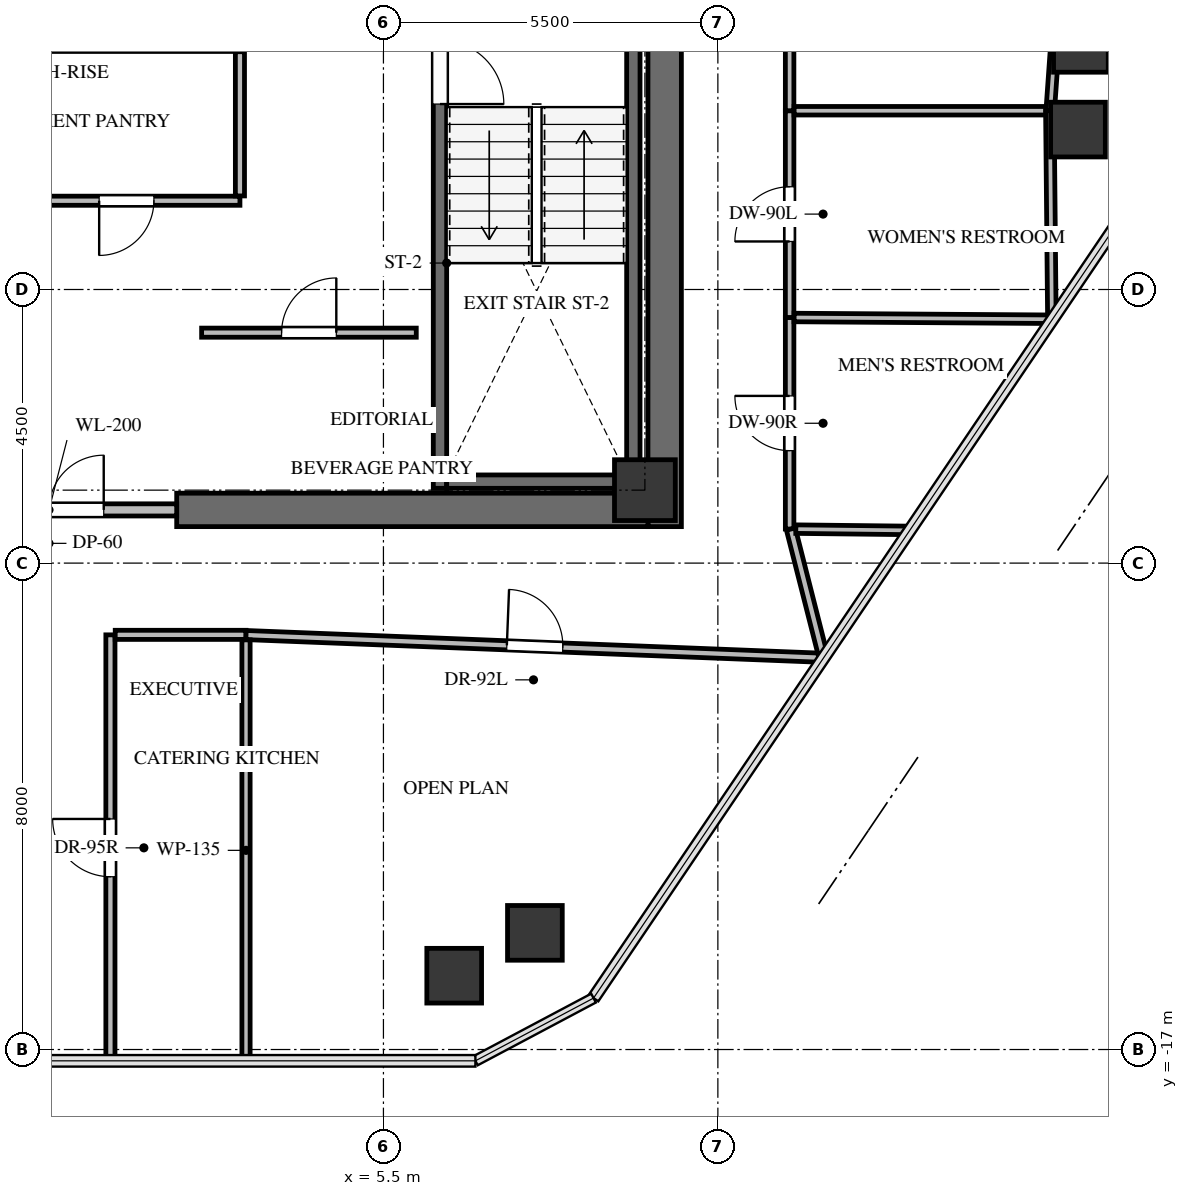
"""IFC4 building model, lengths in metres.
Left out: names, types, materials, properties, quantities, classifications, styles, units other than length and angle.
Written with IfcOpenShell. Run it as: python <this file> out.ifc"""

import sys

from ifc_helpers import new_model, si_unit, direction, frame, frame_2d, origin, origin_2d, place, context, subcontext, project, spatial, rectangle, extrude, source, transform, mapped, element, fill, save


model = new_model("IFC4")
c1 = context("Model", 3, precision=1e-05, world=origin(), true_north=direction((0.0, 1.0)))
c2 = subcontext(c1, "Body", "Model", "MODEL_VIEW")
j1 = project(units=[si_unit("LENGTHUNIT", "METRE"), si_unit("PLANEANGLEUNIT", "RADIAN")], contexts=[c1])
p1 = place(None, origin())
s1 = spatial("IfcSite", under=j1, at=p1, CompositionType="ELEMENT")
p2 = place(p1, origin())
s2 = spatial("IfcBuilding", under=s1, at=p2, CompositionType="ELEMENT")
p3 = place(p2, frame((0.0, 0.0, 224.9)))
s3 = spatial("IfcBuildingStorey", under=s2, at=p3, CompositionType="ELEMENT", Elevation=224.9)
p4 = place(p3, frame((10.125, -8.4, 0.0), z_axis=(0.0, 0.0, 1.0), x_axis=(0.0, 1.0, 0.0)))
e1 = element("IfcWall", 1, at=p4, inside=s3, PredefinedType="SHEAR", context=c2, shape_type="SweptSolid", body=[
    extrude(rectangle(XDim=16.8, YDim=0.55, at=frame_2d((8.4, 0.0))), origin(), (0.0, 0.0, 1.0), 3.3),
])
p5 = place(p3, frame((2.1, -8.125, 0.0), z_axis=(0.0, 0.0, 1.0), x_axis=(1.0, 0.0, 0.0)))
e2 = element("IfcWall", 2, at=p5, inside=s3, PredefinedType="SHEAR", context=c2, shape_type="SweptSolid", body=[
    extrude(rectangle(XDim=7.75, YDim=0.55, at=frame_2d((3.875, 0.0))), origin(), (0.0, 0.0, 1.0), 3.3),
])
p6 = place(p3, frame((9.61, -7.77, -0.24), z_axis=(0.0, 0.0, 1.0), x_axis=(0.0, 1.0, 0.0)))
e3 = element("IfcWall", 3, at=p6, inside=s3, PredefinedType="SHEAR", context=c2, shape_type="SweptSolid", body=[
    extrude(rectangle(XDim=7.89, YDim=0.22, at=frame_2d((3.945, 0.0))), origin(), (0.0, 0.0, 1.0), 3.3),
])
p7 = place(p3, frame((6.43, 0.12, -0.24), z_axis=(0.0, 0.0, 1.0), x_axis=(0.0, -1.0, 0.0)))
e4 = element("IfcWall", 4, at=p7, inside=s3, PredefinedType="SHEAR", context=c2, shape_type="SweptSolid", body=[
    extrude(rectangle(XDim=7.89, YDim=0.22, at=frame_2d((3.945, 0.0))), origin(), (0.0, 0.0, 1.0), 3.3),
])
p8 = place(p7, frame((0.52, 0.0, 0.0)))
e5 = element("IfcOpeningElement", 5, at=p8, cuts=e4, PredefinedType="OPENING", context=c2, shape_type="SweptSolid", body=[
    extrude(rectangle(XDim=1.05, YDim=2.15, at=frame_2d((0.525, 1.075))), frame((0.0, 0.12, 0.0), z_axis=(0.0, -1.0, 0.0), x_axis=(1.0, 0.0, 0.0)), (0.0, 0.0, 1.0), 0.24),
])
p9 = place(p3, frame((6.54, -7.66, -0.24), z_axis=(0.0, 0.0, 1.0), x_axis=(1.0, 0.0, 0.0)))
e6 = element("IfcWall", 6, at=p9, inside=s3, PredefinedType="SHEAR", context=c2, shape_type="SweptSolid", body=[
    extrude(rectangle(XDim=2.96, YDim=0.22, at=frame_2d((1.48, 0.0))), origin(), (0.0, 0.0, 1.0), 3.3),
])
m1 = source(origin(), c2, "Body", "SweptSolid", [
    extrude(rectangle(XDim=1.0, YDim=1.0, at=origin_2d()), origin(), (0.0, 0.0, 1.0), 3.3),
])
p10 = place(p3, frame((9.8, -7.8, -0.24), z_axis=(0.0, 0.0, 1.0), x_axis=(1.0, 0.0, 0.0)))
e7 = element("IfcColumn", 7, at=p10, inside=s3, PredefinedType="COLUMN", context=c2, shape_type="MappedRepresentation", body=[
    mapped(m1, transform((0.0, 0.0, 0.0), x_axis=(1.0, 0.0, 0.0), y_axis=(0.0, 1.0, 0.0), z_axis=(0.0, 0.0, 1.0), scale=1.0)),
])
m2 = source(origin(), c2, "Body", "SweptSolid", [
    extrude(rectangle(XDim=0.9, YDim=0.9, at=origin_2d()), origin(), (0.0, 0.0, 1.0), 3.3),
])
for number, where, z_axis, x_axis in (
    (8, (16.97, -0.476, -0.24), (0.0, 0.0, 1.0), (1.0, 0.0, 0.0)),
    (9, (16.922, -1.87, -0.24), (0.0, 0.0, 1.0), (1.0, 0.0, 0.0)),
    (10, (7.991, -15.081, -0.24), (0.0, 0.0, 1.0), (1.0, 0.0, 0.0)),
    (11, (6.664, -15.786, -0.24), (0.0, 0.0, 1.0), (1.0, 0.0, 0.0)),
):
    element("IfcColumn", number, at=place(p3, frame(where, z_axis=z_axis, x_axis=x_axis)), inside=s3, PredefinedType="COLUMN", context=c2, shape_type="MappedRepresentation", body=[
        mapped(m2, transform((0.0, 0.0, 0.0), x_axis=(1.0, 0.0, 0.0), y_axis=(0.0, 1.0, 0.0), z_axis=(0.0, 0.0, 1.0), scale=1.0)),
    ])
p11 = place(p3, frame((-2.1, -8.125, 0.0), z_axis=(0.0, 0.0, 1.0), x_axis=(1.0, 0.0, 0.0)))
e12 = element("IfcWall", 12, at=p11, inside=s3, PredefinedType="SOLIDWALL", context=c2, shape_type="SweptSolid", body=[
    extrude(rectangle(XDim=4.2, YDim=0.2, at=frame_2d((2.1, 0.0))), origin(), (0.0, 0.0, 1.0), 3.045),
])
p12 = place(p11, frame((1.2, 0.0, 0.0)))
e13 = element("IfcOpeningElement", 13, at=p12, cuts=e12, PredefinedType="OPENING", context=c2, shape_type="SweptSolid", body=[
    extrude(rectangle(XDim=1.8, YDim=2.15, at=frame_2d((0.9, 1.075))), frame((0.0, 0.11, 0.0), z_axis=(0.0, -1.0, 0.0), x_axis=(1.0, 0.0, 0.0)), (0.0, 0.0, 1.0), 0.22),
])
p13 = place(p3, frame((2.51, -5.21, 0.0), z_axis=(0.0, 0.0, 1.0), x_axis=(1.0, 0.0, 0.0)))
e14 = element("IfcWall", 14, at=p13, inside=s3, PredefinedType="PARTITIONING", context=c2, shape_type="SweptSolid", body=[
    extrude(rectangle(XDim=3.53, YDim=0.15, at=frame_2d((1.765, 0.0))), origin(), (0.0, 0.0, 1.0), 3.045),
])
p14 = place(p13, frame((1.315, 0.0, 0.0)))
e15 = element("IfcOpeningElement", 15, at=p14, cuts=e14, PredefinedType="OPENING", context=c2, shape_type="SweptSolid", body=[
    extrude(rectangle(XDim=0.9, YDim=2.05, at=frame_2d((0.45, 1.025))), frame((0.0, 0.085, 0.0), z_axis=(0.0, -1.0, 0.0), x_axis=(1.0, 0.0, 0.0)), (0.0, 0.0, 1.0), 0.17),
])
p15 = place(p3, frame((3.14, -3.04, 0.0), z_axis=(0.0, 0.0, 1.0), x_axis=(-1.0, 0.0, 0.0)))
e16 = element("IfcWall", 16, at=p15, inside=s3, PredefinedType="PARTITIONING", context=c2, shape_type="SweptSolid", body=[
    extrude(rectangle(XDim=3.73, YDim=0.15, at=frame_2d((1.865, 0.0))), origin(), (0.0, 0.0, 1.0), 3.045),
])
p16 = place(p15, frame((1.415, 0.0, 0.0)))
e17 = element("IfcOpeningElement", 17, at=p16, cuts=e16, PredefinedType="OPENING", context=c2, shape_type="SweptSolid", body=[
    extrude(rectangle(XDim=0.9, YDim=2.05, at=frame_2d((0.45, 1.025))), frame((0.0, 0.085, 0.0), z_axis=(0.0, -1.0, 0.0), x_axis=(1.0, 0.0, 0.0)), (0.0, 0.0, 1.0), 0.17),
])
p17 = place(p3, frame((3.14, -0.589, 0.0), z_axis=(0.0, 0.0, 1.0), x_axis=(0.0, -1.0, 0.0)))
e18 = element("IfcWall", 18, at=p17, inside=s3, PredefinedType="PARTITIONING", context=c2, shape_type="SweptSolid", body=[
    extrude(rectangle(XDim=2.372, YDim=0.15, at=frame_2d((1.186, 0.0))), origin(), (0.0, 0.0, 1.0), 3.045),
])
p18 = place(p3, frame((12.18, -8.44, 0.0), z_axis=(0.0, 0.0, 1.0), x_axis=(0.0, 1.0, 0.0)))
e19 = element("IfcWall", 19, at=p18, inside=s3, PredefinedType="PARTITIONING", context=c2, shape_type="SweptSolid", body=[
    extrude(rectangle(XDim=3.48, YDim=0.14, at=frame_2d((1.74, 0.0))), origin(), (0.0, 0.0, 1.0), 2.399),
])
p19 = place(p18, frame((1.29, 0.0, 0.0)))
e20 = element("IfcOpeningElement", 20, at=p19, cuts=e19, PredefinedType="OPENING", context=c2, shape_type="SweptSolid", body=[
    extrude(rectangle(XDim=0.9, YDim=2.05, at=frame_2d((0.45, 1.025))), frame((0.0, 0.08, 0.0), z_axis=(0.0, -1.0, 0.0), x_axis=(1.0, 0.0, 0.0)), (0.0, 0.0, 1.0), 0.16),
])
p20 = place(p3, frame((12.18, -4.96, 0.0), z_axis=(0.0, 0.0, 1.0), x_axis=(0.0, 1.0, 0.0)))
e21 = element("IfcWall", 21, at=p20, inside=s3, PredefinedType="PARTITIONING", context=c2, shape_type="SweptSolid", body=[
    extrude(rectangle(XDim=3.4, YDim=0.14, at=frame_2d((1.7, 0.0))), origin(), (0.0, 0.0, 1.0), 3.045),
])
p21 = place(p20, frame((1.25, 0.0, 0.0)))
e22 = element("IfcOpeningElement", 22, at=p21, cuts=e21, PredefinedType="OPENING", context=c2, shape_type="SweptSolid", body=[
    extrude(rectangle(XDim=0.9, YDim=2.05, at=frame_2d((0.45, 1.025))), frame((0.0, 0.08, 0.0), z_axis=(0.0, -1.0, 0.0), x_axis=(1.0, 0.0, 0.0)), (0.0, 0.0, 1.0), 0.16),
])
p22 = place(p3, frame((12.18, -1.56, 0.0), z_axis=(0.0, 0.0, 1.0), x_axis=(0.0, 1.0, 0.0)))
e23 = element("IfcWall", 23, at=p22, inside=s3, PredefinedType="PARTITIONING", context=c2, shape_type="SweptSolid", body=[
    extrude(rectangle(XDim=4.05, YDim=0.14, at=frame_2d((2.025, 0.0))), origin(), (0.0, 0.0, 1.0), 2.302),
])
p23 = place(p22, frame((1.575, 0.0, 0.0)))
e24 = element("IfcOpeningElement", 24, at=p23, cuts=e23, PredefinedType="OPENING", context=c2, shape_type="SweptSolid", body=[
    extrude(rectangle(XDim=0.9, YDim=2.05, at=frame_2d((0.45, 1.025))), frame((0.0, 0.08, 0.0), z_axis=(0.0, -1.0, 0.0), x_axis=(1.0, 0.0, 0.0)), (0.0, 0.0, 1.0), 0.16),
])
p24 = place(p3, frame((1.01, -17.186, 0.0), z_axis=(0.0, 0.0, 1.0), x_axis=(0.0, 1.0, 0.0)))
e25 = element("IfcWall", 25, at=p24, inside=s3, PredefinedType="PARTITIONING", context=c2, shape_type="SweptSolid", body=[
    extrude(rectangle(XDim=7.006, YDim=0.15, at=frame_2d((3.503, 0.0))), origin(), (0.0, 0.0, 1.0), 2.399),
])
p25 = place(p24, frame((3.028, 0.0, 0.0)))
e26 = element("IfcOpeningElement", 26, at=p25, cuts=e25, PredefinedType="OPENING", context=c2, shape_type="SweptSolid", body=[
    extrude(rectangle(XDim=0.95, YDim=2.1, at=frame_2d((0.475, 1.05))), frame((0.0, 0.085, 0.0), z_axis=(0.0, -1.0, 0.0), x_axis=(1.0, 0.0, 0.0)), (0.0, 0.0, 1.0), 0.17),
])
p26 = place(p3, frame((1.089, -10.18, 0.0), z_axis=(0.0, 0.0, 1.0), x_axis=(1.0, 0.0, 0.0)))
e27 = element("IfcWall", 27, at=p26, inside=s3, PredefinedType="PARTITIONING", context=c2, shape_type="SweptSolid", body=[
    extrude(rectangle(XDim=2.151, YDim=0.15, at=frame_2d((1.075, 0.0))), origin(), (0.0, 0.0, 1.0), 3.045),
])
p27 = place(p3, frame((3.24, -10.183, 0.0), z_axis=(0.0, 0.0, 1.0), x_axis=(0.999222675532, -0.039421373675, 0.0)))
e28 = element("IfcWall", 28, at=p27, inside=s3, PredefinedType="PARTITIONING", context=c2, shape_type="SweptSolid", body=[
    extrude(rectangle(XDim=9.506, YDim=0.15, at=frame_2d((4.753, 0.0))), origin(), (0.0, 0.0, 1.0), 2.302),
])
p28 = place(p27, frame((4.293, 0.0, 0.0)))
e29 = element("IfcOpeningElement", 29, at=p28, cuts=e28, PredefinedType="OPENING", context=c2, shape_type="SweptSolid", body=[
    extrude(rectangle(XDim=0.92, YDim=2.1, at=frame_2d((0.46, 1.05))), frame((0.0, 0.085, 0.0), z_axis=(0.0, -1.0, 0.0), x_axis=(1.0, 0.0, 0.0)), (0.0, 0.0, 1.0), 0.17),
])
p29 = place(p3, frame((12.719, -10.478, 0.0), z_axis=(0.0, 0.0, 1.0), x_axis=(-0.246494896578, 0.96914408937, 0.0)))
e30 = element("IfcWall", 30, at=p29, inside=s3, PredefinedType="PARTITIONING", context=c2, shape_type="SweptSolid", body=[
    extrude(rectangle(XDim=2.103, YDim=0.15, at=frame_2d((1.051, 0.0))), origin(), (0.0, 0.0, 1.0), 2.399),
])
p30 = place(p3, frame((12.254, -4.96, 0.0), z_axis=(0.0, 0.0, 1.0), x_axis=(0.999976630429, -0.006836563198, 0.0)))
e31 = element("IfcWall", 31, at=p30, inside=s3, PredefinedType="PARTITIONING", context=c2, shape_type="SweptSolid", body=[
    extrude(rectangle(XDim=4.25, YDim=0.14, at=frame_2d((2.125, 0.0))), origin(), (0.0, 0.0, 1.0), 2.399),
])
p31 = place(p3, frame((14.156, -8.462, 0.0), z_axis=(0.0, 0.0, 1.0), x_axis=(-0.999935742613, 0.011336253532, 0.0)))
e32 = element("IfcWall", 32, at=p31, inside=s3, PredefinedType="PARTITIONING", context=c2, shape_type="SweptSolid", body=[
    extrude(rectangle(XDim=1.874, YDim=0.14, at=frame_2d((0.937, 0.0))), origin(), (0.0, 0.0, 1.0), 2.399),
])
p32 = place(p3, frame((12.254, -1.56, 0.0), z_axis=(0.0, 0.0, 1.0), x_axis=(1.0, 0.0, 0.0)))
e33 = element("IfcWall", 33, at=p32, inside=s3, PredefinedType="PARTITIONING", context=c2, shape_type="SweptSolid", body=[
    extrude(rectangle(XDim=4.206, YDim=0.14, at=frame_2d((2.103, 0.0))), origin(), (0.0, 0.0, 1.0), 2.302),
])
p33 = place(p3, frame((16.46, -1.56, 0.0), z_axis=(0.0, 0.0, 1.0), x_axis=(0.009604446748, -0.999953876238, 0.0)))
e34 = element("IfcWall", 34, at=p33, inside=s3, PredefinedType="PARTITIONING", context=c2, shape_type="SweptSolid", body=[
    extrude(rectangle(XDim=3.355, YDim=0.14, at=frame_2d((1.678, 0.0))), origin(), (0.0, 0.0, 1.0), 2.302),
])
p34 = place(p3, frame((16.76, 2.593, 0.0), z_axis=(0.0, 0.0, 1.0), x_axis=(-0.07055102187, -0.997508172053, 0.0)))
e35 = element("IfcWall", 35, at=p34, inside=s3, PredefinedType="PARTITIONING", context=c2, shape_type="SweptSolid", body=[
    extrude(rectangle(XDim=4.163, YDim=0.14, at=frame_2d((2.082, 0.0))), origin(), (0.0, 0.0, 1.0), 2.302),
])
p35 = place(p3, frame((3.24, -10.262, 0.0), z_axis=(0.0, 0.0, 1.0), x_axis=(0.0, -1.0, 0.0)))
e36 = element("IfcWall", 36, at=p35, inside=s3, PredefinedType="PARTITIONING", context=c2, shape_type="SweptSolid", body=[
    extrude(rectangle(XDim=6.924, YDim=0.135, at=frame_2d((3.462, 0.0))), origin(), (0.0, 0.0, 1.0), 2.399),
])
m3 = source(origin(), c2, "Body", "SweptSolid", [
    extrude(rectangle(XDim=1.05, YDim=2.15, at=frame_2d((0.525, 1.075))), frame((0.0, 0.025, 0.0), z_axis=(0.0, -1.0, 0.0), x_axis=(1.0, 0.0, 0.0)), (0.0, 0.0, 1.0), 0.05),
])
p36 = place(p8, origin())
e37 = element("IfcDoor", 37, at=p36, inside=s3, OperationType="SINGLE_SWING_RIGHT", PredefinedType="DOOR", context=c2, shape_type="MappedRepresentation", body=[
    mapped(m3, transform((0.0, 0.0, 0.0), x_axis=(1.0, 0.0, 0.0), y_axis=(0.0, 1.0, 0.0), z_axis=(0.0, 0.0, 1.0), scale=1.0)),
])
fill(e5, e37)
m4 = source(origin(), c2, "Body", "SweptSolid", [
    extrude(rectangle(XDim=1.8, YDim=2.15, at=frame_2d((0.9, 1.075))), frame((0.0, 0.025, 0.0), z_axis=(0.0, -1.0, 0.0), x_axis=(1.0, 0.0, 0.0)), (0.0, 0.0, 1.0), 0.05),
])
p37 = place(p12, origin())
e38 = element("IfcDoor", 38, at=p37, inside=s3, OperationType="DOUBLE_DOOR_SINGLE_SWING", PredefinedType="DOOR", context=c2, shape_type="MappedRepresentation", body=[
    mapped(m4, transform((0.0, 0.0, 0.0), x_axis=(1.0, 0.0, 0.0), y_axis=(0.0, 1.0, 0.0), z_axis=(0.0, 0.0, 1.0), scale=1.0)),
])
fill(e13, e38)
m5 = source(origin(), c2, "Body", "SweptSolid", [
    extrude(rectangle(XDim=0.9, YDim=2.05, at=frame_2d((0.45, 1.025))), frame((0.0, 0.025, 0.0), z_axis=(0.0, -1.0, 0.0), x_axis=(1.0, 0.0, 0.0)), (0.0, 0.0, 1.0), 0.05),
])
p38 = place(p14, origin())
e39 = element("IfcDoor", 39, at=p38, inside=s3, OperationType="SINGLE_SWING_RIGHT", PredefinedType="DOOR", context=c2, shape_type="MappedRepresentation", body=[
    mapped(m5, transform((0.0, 0.0, 0.0), x_axis=(1.0, 0.0, 0.0), y_axis=(0.0, 1.0, 0.0), z_axis=(0.0, 0.0, 1.0), scale=1.0)),
])
fill(e15, e39)
p39 = place(p16, origin())
e40 = element("IfcDoor", 40, at=p39, inside=s3, OperationType="SINGLE_SWING_RIGHT", PredefinedType="DOOR", context=c2, shape_type="MappedRepresentation", body=[
    mapped(m5, transform((0.0, 0.0, 0.0), x_axis=(1.0, 0.0, 0.0), y_axis=(0.0, 1.0, 0.0), z_axis=(0.0, 0.0, 1.0), scale=1.0)),
])
fill(e17, e40)
m6 = source(origin(), c2, "Body", "SweptSolid", [
    extrude(rectangle(XDim=0.9, YDim=2.05, at=frame_2d((0.45, 1.025))), frame((0.0, 0.025, 0.0), z_axis=(0.0, -1.0, 0.0), x_axis=(1.0, 0.0, 0.0)), (0.0, 0.0, 1.0), 0.05),
])
p40 = place(p19, origin())
e41 = element("IfcDoor", 41, at=p40, inside=s3, OperationType="SINGLE_SWING_RIGHT", PredefinedType="DOOR", context=c2, shape_type="MappedRepresentation", body=[
    mapped(m6, transform((0.0, 0.0, 0.0), x_axis=(1.0, 0.0, 0.0), y_axis=(0.0, 1.0, 0.0), z_axis=(0.0, 0.0, 1.0), scale=1.0)),
])
fill(e20, e41)
m7 = source(origin(), c2, "Body", "SweptSolid", [
    extrude(rectangle(XDim=0.9, YDim=2.05, at=frame_2d((0.45, 1.025))), frame((0.0, 0.025, 0.0), z_axis=(0.0, -1.0, 0.0), x_axis=(1.0, 0.0, 0.0)), (0.0, 0.0, 1.0), 0.05),
])
p41 = place(p21, origin())
e42 = element("IfcDoor", 42, at=p41, inside=s3, OperationType="SINGLE_SWING_LEFT", PredefinedType="DOOR", context=c2, shape_type="MappedRepresentation", body=[
    mapped(m7, transform((0.0, 0.0, 0.0), x_axis=(1.0, 0.0, 0.0), y_axis=(0.0, 1.0, 0.0), z_axis=(0.0, 0.0, 1.0), scale=1.0)),
])
fill(e22, e42)
m8 = source(origin(), c2, "Body", "SweptSolid", [
    extrude(rectangle(XDim=0.95, YDim=2.1, at=frame_2d((0.475, 1.05))), frame((0.0, 0.025, 0.0), z_axis=(0.0, -1.0, 0.0), x_axis=(1.0, 0.0, 0.0)), (0.0, 0.0, 1.0), 0.05),
])
p42 = place(p25, origin())
e43 = element("IfcDoor", 43, at=p42, inside=s3, OperationType="SINGLE_SWING_RIGHT", PredefinedType="DOOR", context=c2, shape_type="MappedRepresentation", body=[
    mapped(m8, transform((0.0, 0.0, 0.0), x_axis=(1.0, 0.0, 0.0), y_axis=(0.0, 1.0, 0.0), z_axis=(0.0, 0.0, 1.0), scale=1.0)),
])
fill(e26, e43)
m9 = source(origin(), c2, "Body", "SweptSolid", [
    extrude(rectangle(XDim=0.92, YDim=2.1, at=frame_2d((0.46, 1.05))), frame((0.0, 0.025, 0.0), z_axis=(0.0, -1.0, 0.0), x_axis=(1.0, 0.0, 0.0)), (0.0, 0.0, 1.0), 0.05),
])
p43 = place(p28, origin())
e44 = element("IfcDoor", 44, at=p43, inside=s3, OperationType="SINGLE_SWING_LEFT", PredefinedType="DOOR", context=c2, shape_type="MappedRepresentation", body=[
    mapped(m9, transform((0.0, 0.0, 0.0), x_axis=(1.0, 0.0, 0.0), y_axis=(0.0, 1.0, 0.0), z_axis=(0.0, 0.0, 1.0), scale=1.0)),
])
fill(e29, e44)
save(model, sys.argv[1])
